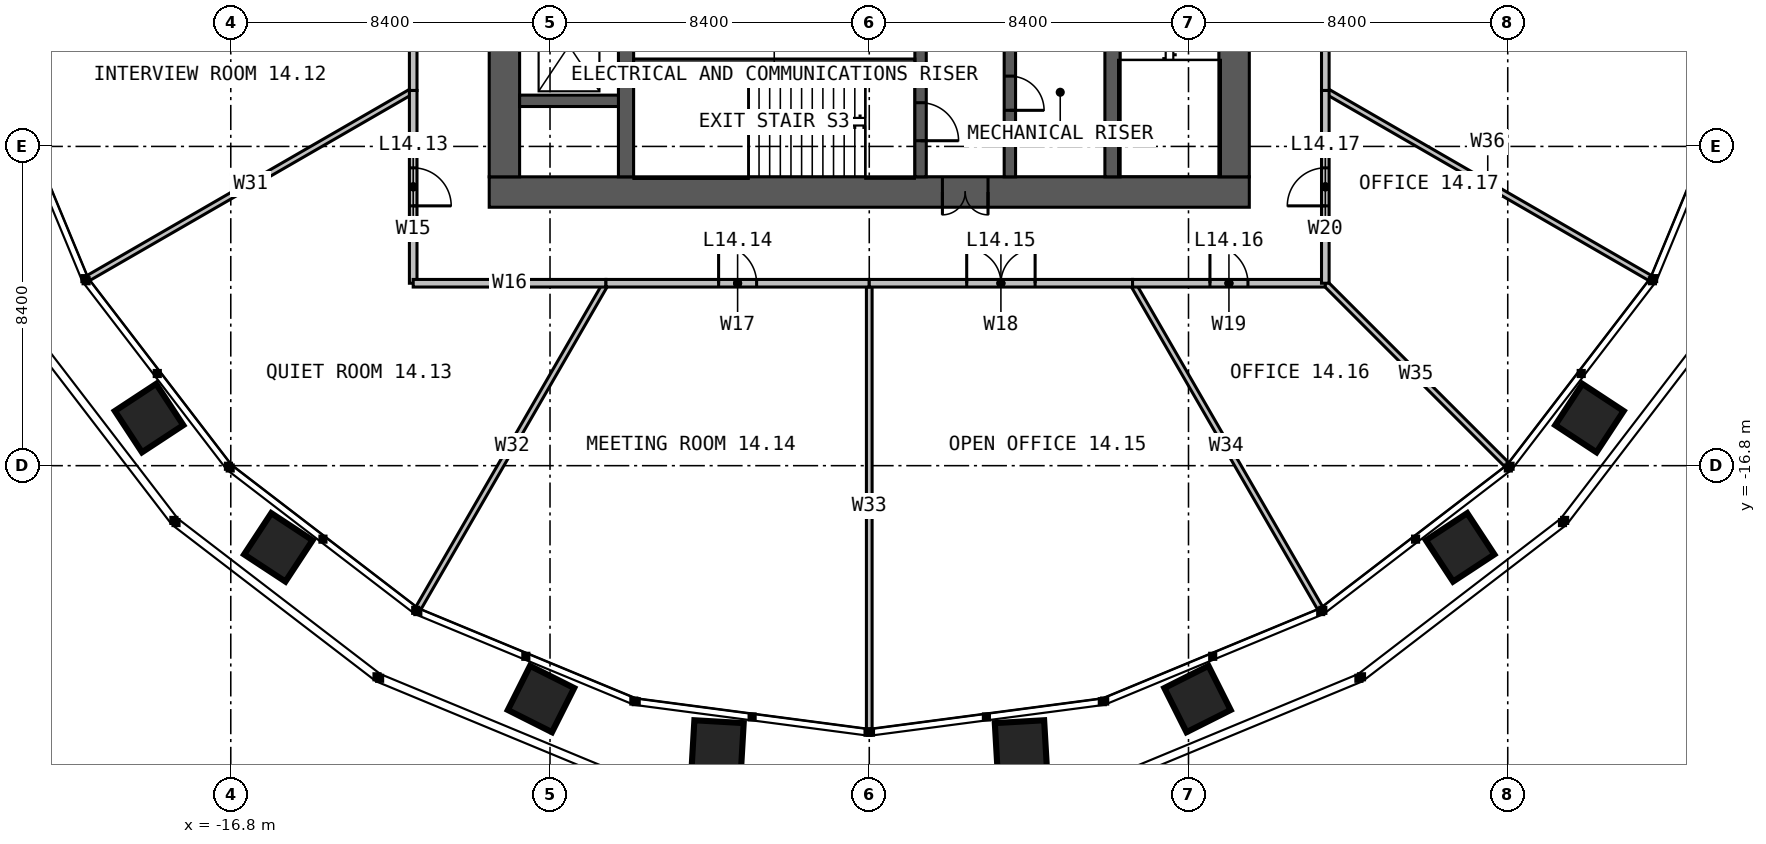
"""IFC4 building model, lengths in metres.
Left out: names, types, materials, properties, quantities, classifications, styles, units other than length and angle.
Written with IfcOpenShell. Run it as: python <this file> out.ifc"""

import sys

from ifc_helpers import new_model, si_unit, direction, frame, frame_2d, origin, place, context, subcontext, project, spatial, rectangle, extrude, element, fill, save


model = new_model("IFC4")
c1 = context("Model", 3, precision=1e-05, world=origin(), true_north=direction((0.0, 1.0)))
c2 = subcontext(c1, "Body", "Model", "MODEL_VIEW")
j1 = project(units=[si_unit("LENGTHUNIT", "METRE"), si_unit("PLANEANGLEUNIT", "RADIAN")], contexts=[c1])
p1 = place(None, origin())
s1 = spatial("IfcSite", under=j1, at=p1, CompositionType="ELEMENT")
p2 = place(p1, origin())
s2 = spatial("IfcBuilding", under=s1, at=p2, CompositionType="ELEMENT")
p3 = place(p2, frame((0.0, 0.0, 61.0)))
s3 = spatial("IfcBuildingStorey", under=s2, at=p3, CompositionType="ELEMENT", Elevation=61.0)
p4 = place(p3, frame((10.0, -9.6, 0.0), z_axis=(0.0, 0.0, 1.0), x_axis=(-1.0, 0.0, 0.0)))
e1 = element("IfcWall", 1, at=p4, inside=s3, PredefinedType="SOLIDWALL", context=c2, shape_type="SweptSolid", body=[
    extrude(rectangle(XDim=20.0, YDim=0.8, at=frame_2d((10.0, 0.0))), origin(), (0.0, 0.0, 1.0), 4.0),
])
p5 = place(p4, frame((6.875, 0.0, 0.0)))
e2 = element("IfcOpeningElement", 2, at=p5, cuts=e1, PredefinedType="OPENING", context=c2, shape_type="SweptSolid", body=[
    extrude(rectangle(XDim=1.2, YDim=2.2, at=frame_2d((0.6, 1.1))), frame((0.0, 0.41, 0.0), z_axis=(0.0, -1.0, 0.0), x_axis=(1.0, 0.0, 0.0)), (0.0, 0.0, 1.0), 0.82),
])
for number, where, z_axis, x_axis in (
    (3, (9.6, -9.2, 0.0), (0.0, 0.0, 1.0), (0.0, 1.0, 0.0)),
    (4, (-9.6, 9.2, 0.0), (0.0, 0.0, 1.0), (0.0, -1.0, 0.0)),
):
    element("IfcWall", number, at=place(p3, frame(where, z_axis=z_axis, x_axis=x_axis)), inside=s3, PredefinedType="SOLIDWALL", context=c2, shape_type="SweptSolid", body=[
        extrude(rectangle(XDim=18.4, YDim=0.8, at=frame_2d((9.2, 0.0))), origin(), (0.0, 0.0, 1.0), 4.0),
    ])
p6 = place(p3, frame((-6.4, -9.2, 0.0), z_axis=(0.0, 0.0, 1.0), x_axis=(0.0, 1.0, 0.0)))
e5 = element("IfcWall", 5, at=p6, inside=s3, PredefinedType="SOLIDWALL", context=c2, shape_type="SweptSolid", body=[
    extrude(rectangle(XDim=18.4, YDim=0.4, at=frame_2d((9.2, 0.0))), origin(), (0.0, 0.0, 1.0), 4.0),
])
p7 = place(p6, frame((8.7, 0.0, 0.0)))
e6 = element("IfcOpeningElement", 6, at=p7, cuts=e5, PredefinedType="OPENING", context=c2, shape_type="SweptSolid", body=[
    extrude(rectangle(XDim=1.0, YDim=2.2, at=frame_2d((0.5, 1.1))), frame((0.0, 0.21, 0.0), z_axis=(0.0, -1.0, 0.0), x_axis=(1.0, 0.0, 0.0)), (0.0, 0.0, 1.0), 0.42),
])
p8 = place(p3, frame((6.4, 9.2, 0.0), z_axis=(0.0, 0.0, 1.0), x_axis=(0.0, -1.0, 0.0)))
e7 = element("IfcWall", 7, at=p8, inside=s3, PredefinedType="SOLIDWALL", context=c2, shape_type="SweptSolid", body=[
    extrude(rectangle(XDim=18.4, YDim=0.4, at=frame_2d((9.2, 0.0))), origin(), (0.0, 0.0, 1.0), 4.0),
])
p9 = place(p8, frame((8.7, 0.0, 0.0)))
e8 = element("IfcOpeningElement", 8, at=p9, cuts=e7, PredefinedType="OPENING", context=c2, shape_type="SweptSolid", body=[
    extrude(rectangle(XDim=1.0, YDim=2.2, at=frame_2d((0.5, 1.1))), frame((0.0, 0.21, 0.0), z_axis=(0.0, -1.0, 0.0), x_axis=(1.0, 0.0, 0.0)), (0.0, 0.0, 1.0), 0.42),
])
p10 = place(p3, frame((1.35, -1.45, 0.0), z_axis=(0.0, 0.0, 1.0), x_axis=(0.0, -1.0, 0.0)))
e9 = element("IfcWall", 9, at=p10, inside=s3, PredefinedType="SOLIDWALL", context=c2, shape_type="SweptSolid", body=[
    extrude(rectangle(XDim=7.75, YDim=0.3, at=frame_2d((3.875, 0.0))), origin(), (0.0, 0.0, 1.0), 4.0),
])
p11 = place(p10, frame((5.8, 0.0, 0.0)))
e10 = element("IfcOpeningElement", 10, at=p11, cuts=e9, PredefinedType="OPENING", context=c2, shape_type="SweptSolid", body=[
    extrude(rectangle(XDim=1.0, YDim=2.2, at=frame_2d((0.5, 1.1))), frame((0.0, 0.16, 0.0), z_axis=(0.0, -1.0, 0.0), x_axis=(1.0, 0.0, 0.0)), (0.0, 0.0, 1.0), 0.32),
])
p12 = place(p10, frame((3.525, 0.0, 0.0)))
e11 = element("IfcOpeningElement", 11, at=p12, cuts=e9, PredefinedType="OPENING", context=c2, shape_type="SweptSolid", body=[
    extrude(rectangle(XDim=0.9, YDim=2.2, at=frame_2d((0.45, 1.1))), frame((0.0, 0.16, 0.0), z_axis=(0.0, -1.0, 0.0), x_axis=(1.0, 0.0, 0.0)), (0.0, 0.0, 1.0), 0.32),
])
p13 = place(p3, frame((3.7, -1.45, 0.0), z_axis=(0.0, 0.0, 1.0), x_axis=(0.0, -1.0, 0.0)))
e12 = element("IfcWall", 12, at=p13, inside=s3, PredefinedType="SOLIDWALL", context=c2, shape_type="SweptSolid", body=[
    extrude(rectangle(XDim=7.75, YDim=0.3, at=frame_2d((3.875, 0.0))), origin(), (0.0, 0.0, 1.0), 4.0),
])
p14 = place(p13, frame((5.1, 0.0, 0.0)))
e13 = element("IfcOpeningElement", 13, at=p14, cuts=e12, PredefinedType="OPENING", context=c2, shape_type="SweptSolid", body=[
    extrude(rectangle(XDim=0.9, YDim=2.2, at=frame_2d((0.45, 1.1))), frame((0.0, 0.16, 0.0), z_axis=(0.0, -1.0, 0.0), x_axis=(1.0, 0.0, 0.0)), (0.0, 0.0, 1.0), 0.32),
])
p15 = place(p3, frame((-6.2, -6.2, 0.0), z_axis=(0.0, 0.0, 1.0), x_axis=(1.0, 0.0, 0.0)))
e14 = element("IfcWall", 14, at=p15, inside=s3, PredefinedType="SOLIDWALL", context=c2, shape_type="SweptSolid", body=[
    extrude(rectangle(XDim=7.4, YDim=0.2, at=frame_2d((3.7, 0.0))), origin(), (0.0, 0.0, 1.0), 4.0),
])
p16 = place(p3, frame((-9.2, -7.2, 0.0), z_axis=(0.0, 0.0, 1.0), x_axis=(1.0, 0.0, 0.0)))
e15 = element("IfcWall", 15, at=p16, inside=s3, PredefinedType="SOLIDWALL", context=c2, shape_type="SweptSolid", body=[
    extrude(rectangle(XDim=2.6, YDim=0.3, at=frame_2d((1.3, 0.0))), origin(), (0.0, 0.0, 1.0), 4.0),
])
for number, where, z_axis, x_axis in (
    (16, (12.0, -6.928, 0.0), (0.0, 0.0, 1.0), (0.866, -0.5, 0.0)),
    (17, (-12.0, -6.928, 0.0), (0.0, 0.0, 1.0), (-0.866, -0.5, 0.0)),
    (18, (-6.928, -12.0, 0.0), (0.0, 0.0, 1.0), (-0.5, -0.866, 0.0)),
):
    element("IfcWall", number, at=place(p3, frame(where, z_axis=z_axis, x_axis=x_axis)), inside=s3, PredefinedType="PARTITIONING", context=c2, shape_type="SweptSolid", body=[
        extrude(rectangle(XDim=9.87, YDim=0.15, at=frame_2d((4.935, 0.0))), origin(), (0.0, 0.0, 1.0), 2.79),
    ])
p17 = place(p3, frame((0.0, -12.0, 0.0), z_axis=(0.0, 0.0, 1.0), x_axis=(0.0, -1.0, 0.0)))
e19 = element("IfcWall", 19, at=p17, inside=s3, PredefinedType="PARTITIONING", context=c2, shape_type="SweptSolid", body=[
    extrude(rectangle(XDim=11.726, YDim=0.15, at=frame_2d((5.863, 0.0))), origin(), (0.0, 0.0, 1.0), 2.79),
])
p18 = place(p3, frame((6.928, -12.0, 0.0), z_axis=(0.0, 0.0, 1.0), x_axis=(0.499988678145, -0.866031940362, 0.0)))
e20 = element("IfcWall", 20, at=p18, inside=s3, PredefinedType="PARTITIONING", context=c2, shape_type="SweptSolid", body=[
    extrude(rectangle(XDim=9.87, YDim=0.15, at=frame_2d((4.935, 0.0))), origin(), (0.0, 0.0, 1.0), 2.79),
])
p19 = place(p3, frame((12.0, -12.0, 0.0), z_axis=(0.0, 0.0, 1.0), x_axis=(0.707106781187, -0.707106781187, 0.0)))
e21 = element("IfcWall", 21, at=p19, inside=s3, PredefinedType="PARTITIONING", context=c2, shape_type="SweptSolid", body=[
    extrude(rectangle(XDim=6.756, YDim=0.15, at=frame_2d((3.378, 0.0))), origin(), (0.0, 0.0, 1.0), 2.79),
])
p20 = place(p3, frame((12.0, -6.928, 0.0), z_axis=(0.0, 0.0, 1.0), x_axis=(0.0, 1.0, 0.0)))
e22 = element("IfcWall", 22, at=p20, inside=s3, PredefinedType="PARTITIONING", context=c2, shape_type="SweptSolid", body=[
    extrude(rectangle(XDim=8.508, YDim=0.2, at=frame_2d((4.254, 0.0))), origin(), (0.0, 0.0, 1.0), 3.8),
])
p21 = place(p20, frame((3.354, 0.0, 0.0)))
e23 = element("IfcOpeningElement", 23, at=p21, cuts=e22, PredefinedType="OPENING", context=c2, shape_type="SweptSolid", body=[
    extrude(rectangle(XDim=1.8, YDim=2.2, at=frame_2d((0.9, 1.1))), frame((0.0, 0.11, 0.0), z_axis=(0.0, -1.0, 0.0), x_axis=(1.0, 0.0, 0.0)), (0.0, 0.0, 1.0), 0.22),
])
p22 = place(p3, frame((-12.0, -1.58, 0.0), z_axis=(0.0, 0.0, 1.0), x_axis=(0.0, -1.0, 0.0)))
e24 = element("IfcWall", 24, at=p22, inside=s3, PredefinedType="PARTITIONING", context=c2, shape_type="SweptSolid", body=[
    extrude(rectangle(XDim=5.348, YDim=0.2, at=frame_2d((2.674, 0.0))), origin(), (0.0, 0.0, 1.0), 3.8),
])
p23 = place(p22, frame((2.174, 0.0, 0.0)))
e25 = element("IfcOpeningElement", 25, at=p23, cuts=e24, PredefinedType="OPENING", context=c2, shape_type="SweptSolid", body=[
    extrude(rectangle(XDim=1.0, YDim=2.2, at=frame_2d((0.5, 1.1))), frame((0.0, 0.11, 0.0), z_axis=(0.0, -1.0, 0.0), x_axis=(1.0, 0.0, 0.0)), (0.0, 0.0, 1.0), 0.22),
])
p24 = place(p3, frame((-12.0, -6.928, 0.0), z_axis=(0.0, 0.0, 1.0), x_axis=(0.0, -1.0, 0.0)))
e26 = element("IfcWall", 26, at=p24, inside=s3, PredefinedType="PARTITIONING", context=c2, shape_type="SweptSolid", body=[
    extrude(rectangle(XDim=5.072, YDim=0.2, at=frame_2d((2.536, 0.0))), origin(), (0.0, 0.0, 1.0), 3.8),
])
p25 = place(p24, frame((2.036, 0.0, 0.0)))
e27 = element("IfcOpeningElement", 27, at=p25, cuts=e26, PredefinedType="OPENING", context=c2, shape_type="SweptSolid", body=[
    extrude(rectangle(XDim=1.0, YDim=2.2, at=frame_2d((0.5, 1.1))), frame((0.0, 0.11, 0.0), z_axis=(0.0, -1.0, 0.0), x_axis=(1.0, 0.0, 0.0)), (0.0, 0.0, 1.0), 0.22),
])
p26 = place(p3, frame((-12.0, -12.0, 0.0), z_axis=(0.0, 0.0, 1.0), x_axis=(1.0, 0.0, 0.0)))
e28 = element("IfcWall", 28, at=p26, inside=s3, PredefinedType="PARTITIONING", context=c2, shape_type="SweptSolid", body=[
    extrude(rectangle(XDim=5.072, YDim=0.2, at=frame_2d((2.536, 0.0))), origin(), (0.0, 0.0, 1.0), 3.8),
])
p27 = place(p3, frame((-6.928, -12.0, 0.0), z_axis=(0.0, 0.0, 1.0), x_axis=(1.0, 0.0, 0.0)))
e29 = element("IfcWall", 29, at=p27, inside=s3, PredefinedType="PARTITIONING", context=c2, shape_type="SweptSolid", body=[
    extrude(rectangle(XDim=6.928, YDim=0.2, at=frame_2d((3.464, 0.0))), origin(), (0.0, 0.0, 1.0), 3.8),
])
p28 = place(p27, frame((2.964, 0.0, 0.0)))
e30 = element("IfcOpeningElement", 30, at=p28, cuts=e29, PredefinedType="OPENING", context=c2, shape_type="SweptSolid", body=[
    extrude(rectangle(XDim=1.0, YDim=2.2, at=frame_2d((0.5, 1.1))), frame((0.0, 0.11, 0.0), z_axis=(0.0, -1.0, 0.0), x_axis=(1.0, 0.0, 0.0)), (0.0, 0.0, 1.0), 0.22),
])
p29 = place(p3, frame((0.0, -12.0, 0.0), z_axis=(0.0, 0.0, 1.0), x_axis=(1.0, 0.0, 0.0)))
e31 = element("IfcWall", 31, at=p29, inside=s3, PredefinedType="PARTITIONING", context=c2, shape_type="SweptSolid", body=[
    extrude(rectangle(XDim=6.928, YDim=0.2, at=frame_2d((3.464, 0.0))), origin(), (0.0, 0.0, 1.0), 3.8),
])
p30 = place(p29, frame((2.564, 0.0, 0.0)))
e32 = element("IfcOpeningElement", 32, at=p30, cuts=e31, PredefinedType="OPENING", context=c2, shape_type="SweptSolid", body=[
    extrude(rectangle(XDim=1.8, YDim=2.2, at=frame_2d((0.9, 1.1))), frame((0.0, 0.11, 0.0), z_axis=(0.0, -1.0, 0.0), x_axis=(1.0, 0.0, 0.0)), (0.0, 0.0, 1.0), 0.22),
])
p31 = place(p3, frame((6.928, -12.0, 0.0), z_axis=(0.0, 0.0, 1.0), x_axis=(1.0, 0.0, 0.0)))
e33 = element("IfcWall", 33, at=p31, inside=s3, PredefinedType="PARTITIONING", context=c2, shape_type="SweptSolid", body=[
    extrude(rectangle(XDim=5.072, YDim=0.2, at=frame_2d((2.536, 0.0))), origin(), (0.0, 0.0, 1.0), 3.8),
])
p32 = place(p31, frame((2.036, 0.0, 0.0)))
e34 = element("IfcOpeningElement", 34, at=p32, cuts=e33, PredefinedType="OPENING", context=c2, shape_type="SweptSolid", body=[
    extrude(rectangle(XDim=1.0, YDim=2.2, at=frame_2d((0.5, 1.1))), frame((0.0, 0.11, 0.0), z_axis=(0.0, -1.0, 0.0), x_axis=(1.0, 0.0, 0.0)), (0.0, 0.0, 1.0), 0.22),
])
p33 = place(p3, frame((12.0, -12.0, 0.0), z_axis=(0.0, 0.0, 1.0), x_axis=(0.0, 1.0, 0.0)))
e35 = element("IfcWall", 35, at=p33, inside=s3, PredefinedType="PARTITIONING", context=c2, shape_type="SweptSolid", body=[
    extrude(rectangle(XDim=5.072, YDim=0.2, at=frame_2d((2.536, 0.0))), origin(), (0.0, 0.0, 1.0), 3.8),
])
p34 = place(p33, frame((2.036, 0.0, 0.0)))
e36 = element("IfcOpeningElement", 36, at=p34, cuts=e35, PredefinedType="OPENING", context=c2, shape_type="SweptSolid", body=[
    extrude(rectangle(XDim=1.0, YDim=2.2, at=frame_2d((0.5, 1.1))), frame((0.0, 0.11, 0.0), z_axis=(0.0, -1.0, 0.0), x_axis=(1.0, 0.0, 0.0)), (0.0, 0.0, 1.0), 0.22),
])
p35 = place(p5, origin())
e37 = element("IfcDoor", 37, at=p35, inside=s3, OperationType="DOUBLE_DOOR_SINGLE_SWING", PredefinedType="DOOR", context=c2, shape_type="SweptSolid", body=[
    extrude(rectangle(XDim=1.2, YDim=2.2, at=frame_2d((0.6, 1.1))), frame((0.0, 0.025, 0.0), z_axis=(0.0, -1.0, 0.0), x_axis=(1.0, 0.0, 0.0)), (0.0, 0.0, 1.0), 0.05),
])
fill(e2, e37)
p36 = place(p11, origin())
e38 = element("IfcDoor", 38, at=p36, inside=s3, OperationType="SINGLE_SWING_RIGHT", PredefinedType="DOOR", context=c2, shape_type="SweptSolid", body=[
    extrude(rectangle(XDim=1.0, YDim=2.2, at=frame_2d((0.5, 1.1))), frame((0.0, 0.025, 0.0), z_axis=(0.0, -1.0, 0.0), x_axis=(1.0, 0.0, 0.0)), (0.0, 0.0, 1.0), 0.05),
])
fill(e10, e38)
p37 = place(p14, origin())
e39 = element("IfcDoor", 39, at=p37, inside=s3, OperationType="SINGLE_SWING_RIGHT", PredefinedType="DOOR", context=c2, shape_type="SweptSolid", body=[
    extrude(rectangle(XDim=0.9, YDim=2.2, at=frame_2d((0.45, 1.1))), frame((0.0, 0.025, 0.0), z_axis=(0.0, -1.0, 0.0), x_axis=(1.0, 0.0, 0.0)), (0.0, 0.0, 1.0), 0.05),
])
fill(e13, e39)
p38 = place(p25, origin())
e40 = element("IfcDoor", 40, at=p38, inside=s3, OperationType="SINGLE_SWING_RIGHT", PredefinedType="DOOR", context=c2, shape_type="SweptSolid", body=[
    extrude(rectangle(XDim=1.0, YDim=2.2, at=frame_2d((0.5, 1.1))), frame((0.0, 0.025, 0.0), z_axis=(0.0, -1.0, 0.0), x_axis=(1.0, 0.0, 0.0)), (0.0, 0.0, 1.0), 0.05),
])
fill(e27, e40)
p39 = place(p28, origin())
e41 = element("IfcDoor", 41, at=p39, inside=s3, OperationType="SINGLE_SWING_LEFT", PredefinedType="DOOR", context=c2, shape_type="SweptSolid", body=[
    extrude(rectangle(XDim=1.0, YDim=2.2, at=frame_2d((0.5, 1.1))), frame((0.0, 0.025, 0.0), z_axis=(0.0, -1.0, 0.0), x_axis=(1.0, 0.0, 0.0)), (0.0, 0.0, 1.0), 0.05),
])
fill(e30, e41)
p40 = place(p30, origin())
e42 = element("IfcDoor", 42, at=p40, inside=s3, OperationType="DOUBLE_DOOR_SINGLE_SWING", PredefinedType="DOOR", context=c2, shape_type="SweptSolid", body=[
    extrude(rectangle(XDim=1.8, YDim=2.2, at=frame_2d((0.9, 1.1))), frame((0.0, 0.025, 0.0), z_axis=(0.0, -1.0, 0.0), x_axis=(1.0, 0.0, 0.0)), (0.0, 0.0, 1.0), 0.05),
])
fill(e32, e42)
p41 = place(p32, origin())
e43 = element("IfcDoor", 43, at=p41, inside=s3, OperationType="SINGLE_SWING_LEFT", PredefinedType="DOOR", context=c2, shape_type="SweptSolid", body=[
    extrude(rectangle(XDim=1.0, YDim=2.2, at=frame_2d((0.5, 1.1))), frame((0.0, 0.025, 0.0), z_axis=(0.0, -1.0, 0.0), x_axis=(1.0, 0.0, 0.0)), (0.0, 0.0, 1.0), 0.05),
])
fill(e34, e43)
p42 = place(p34, origin())
e44 = element("IfcDoor", 44, at=p42, inside=s3, OperationType="SINGLE_SWING_LEFT", PredefinedType="DOOR", context=c2, shape_type="SweptSolid", body=[
    extrude(rectangle(XDim=1.0, YDim=2.2, at=frame_2d((0.5, 1.1))), frame((0.0, 0.025, 0.0), z_axis=(0.0, -1.0, 0.0), x_axis=(1.0, 0.0, 0.0)), (0.0, 0.0, 1.0), 0.05),
])
fill(e36, e44)
save(model, sys.argv[1])
